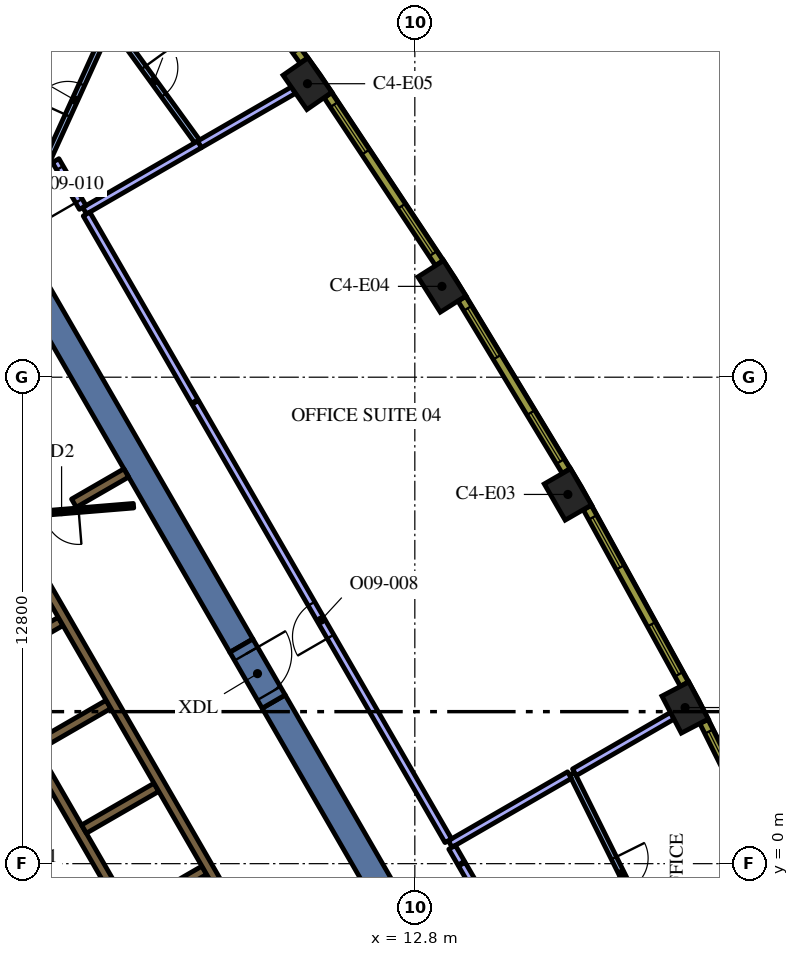
"""IFC4 building model, lengths in metres.
Left out: names, types, materials, properties, quantities, classifications, styles, units other than length and angle.
Written with IfcOpenShell. Run it as: python <this file> out.ifc"""

import sys

from ifc_helpers import new_model, si_unit, direction, frame, frame_2d, origin, origin_2d, place, context, subcontext, project, spatial, rectangle, extrude, element, fill, save


model = new_model("IFC4")
c1 = context("Model", 3, precision=1e-05, world=origin(), true_north=direction((0.0, 1.0)))
c2 = subcontext(c1, "Body", "Model", "MODEL_VIEW")
j1 = project(units=[si_unit("LENGTHUNIT", "METRE"), si_unit("PLANEANGLEUNIT", "RADIAN")], contexts=[c1])
p1 = place(None, origin())
s1 = spatial("IfcSite", under=j1, at=p1, CompositionType="ELEMENT")
p2 = place(p1, origin())
s2 = spatial("IfcBuilding", under=s1, at=p2, CompositionType="ELEMENT")
p3 = place(p2, frame((0.0, 0.0, 243.6)))
s3 = spatial("IfcBuildingStorey", under=s2, at=p3, CompositionType="ELEMENT", Elevation=243.6)
for number, where, z_axis, x_axis in (
    (1, (19.912, 4.108, 0.0), (0.0, 0.0, 1.0), (-0.464, 0.886, 0.0)),
    (2, (16.827, 9.715, 0.0), (0.0, 0.0, 1.0), (-0.5, 0.866, 0.0)),
    (3, (13.513, 15.19, 0.0), (0.0, 0.0, 1.0), (-0.536, 0.845, 0.0)),
    (4, (9.975, 20.522, 0.0), (0.0, 0.0, 1.0), (-0.57, 0.822, 0.0)),
):
    element("IfcColumn", number, at=place(p3, frame(where, z_axis=z_axis, x_axis=x_axis)), inside=s3, PredefinedType="COLUMN", context=c2, shape_type="SweptSolid", body=[
        extrude(rectangle(XDim=1.1, YDim=0.8, at=origin_2d()), origin(), (0.0, 0.0, 1.0), 4.2),
    ])
for number, where, z_axis, x_axis in (
    (5, (9.085, 4.264, 0.0), (0.0, 0.0, 1.0), (0.5, -0.866, 0.0)),
    (6, (8.235, 5.736, 0.0), (0.0, 0.0, 1.0), (-0.5, 0.866, 0.0)),
):
    element("IfcWall", number, at=place(p3, frame(where, z_axis=z_axis, x_axis=x_axis)), inside=s3, PredefinedType="SOLIDWALL", context=c2, shape_type="SweptSolid", body=[
        extrude(rectangle(XDim=12.472, YDim=0.7, at=frame_2d((6.236, 0.0))), origin(), (0.0, 0.0, 1.0), 4.2),
    ])
p4 = place(p3, frame((6.568, -3.627, 0.0), z_axis=(0.0, 0.0, 1.0), x_axis=(-0.499999455981, 0.866025717874, 0.0)))
e7 = element("IfcWall", 7, at=p4, inside=s3, PredefinedType="SOLIDWALL", context=c2, shape_type="SweptSolid", body=[
    extrude(rectangle(XDim=11.978, YDim=0.25, at=frame_2d((5.989, 0.0))), origin(), (0.0, 0.0, 1.0), 4.2),
])
p5 = place(p3, frame((1.574, 5.274, 0.0), z_axis=(0.0, 0.0, 1.0), x_axis=(0.866028486751, 0.499994660107, 0.0)))
e8 = element("IfcWall", 8, at=p5, inside=s3, PredefinedType="SOLIDWALL", context=c2, shape_type="SweptSolid", body=[
    extrude(rectangle(XDim=2.2, YDim=0.25, at=frame_2d((1.1, 0.0))), origin(), (0.0, 0.0, 1.0), 4.2),
])
for number, where, z_axis, x_axis in (
    (9, (2.834, 3.091, 0.0), (0.0, 0.0, 1.0), (0.866, 0.5, 0.0)),
    (10, (4.094, 0.909, 0.0), (0.0, 0.0, 1.0), (0.866, 0.5, 0.0)),
    (11, (5.354, -1.274, 0.0), (0.0, 0.0, 1.0), (0.866, 0.5, 0.0)),
):
    element("IfcWall", number, at=place(p3, frame(where, z_axis=z_axis, x_axis=x_axis)), inside=s3, PredefinedType="SOLIDWALL", context=c2, shape_type="SweptSolid", body=[
        extrude(rectangle(XDim=2.2, YDim=0.25, at=frame_2d((1.1, 0.0))), origin(), (0.0, 0.0, 1.0), 4.2),
    ])
p6 = place(p3, frame((3.83, 9.486, 0.0), z_axis=(0.0, 0.0, 1.0), x_axis=(0.865986202621, 0.500067892261, 0.0)))
e12 = element("IfcWall", 12, at=p6, inside=s3, PredefinedType="SOLIDWALL", context=c2, shape_type="SweptSolid", body=[
    extrude(rectangle(XDim=1.591, YDim=0.25, at=frame_2d((0.795, 0.0))), origin(), (0.0, 0.0, 1.0), 4.2),
])
p7 = place(p3, frame((8.565, -2.185, 0.0), z_axis=(0.0, 0.0, 1.0), x_axis=(-0.499997954832, 0.866026584559, 0.0)))
e13 = element("IfcWall", 13, at=p7, inside=s3, PredefinedType="SOLIDWALL", context=c2, shape_type="SweptSolid", body=[
    extrude(rectangle(XDim=12.35, YDim=0.25, at=frame_2d((6.175, 0.0))), origin(), (0.0, 0.0, 1.0), 4.2),
])
p8 = place(p7, frame((0.585, 0.0, 0.0)))
e14 = element("IfcOpeningElement", 14, at=p8, cuts=e13, PredefinedType="OPENING", context=c2, shape_type="SweptSolid", body=[
    extrude(rectangle(XDim=1.1, YDim=2.1, at=frame_2d((0.55, 1.05))), frame((0.0, 0.135, 0.0), z_axis=(0.0, -1.0, 0.0), x_axis=(1.0, 0.0, 0.0)), (0.0, 0.0, 1.0), 0.27),
])
p9 = place(p3, frame((5.398, 9.419, 0.0), z_axis=(0.0, 0.0, 1.0), x_axis=(-0.996653416376, -0.081743303248, 0.0)))
e15 = element("IfcWall", 15, at=p9, inside=s3, PredefinedType="PARTITIONING", context=c2, shape_type="SweptSolid", body=[
    extrude(rectangle(XDim=2.7, YDim=0.12, at=frame_2d((1.35, 0.0))), origin(), (0.0, 0.0, 1.0), 3.45),
])
p10 = place(p9, frame((1.45, 0.0, 0.0)))
e16 = element("IfcOpeningElement", 16, at=p10, cuts=e15, PredefinedType="OPENING", context=c2, shape_type="SweptSolid", body=[
    extrude(rectangle(XDim=0.9, YDim=2.1, at=frame_2d((0.45, 1.05))), frame((0.0, 0.07, 0.0), z_axis=(0.0, -1.0, 0.0), x_axis=(1.0, 0.0, 0.0)), (0.0, 0.0, 1.0), 0.14),
])
p11 = place(p3, frame((8.235, 5.736, 0.0), z_axis=(0.0, 0.0, 1.0), x_axis=(0.499954529098, -0.86605165483, 0.0)))
e17 = element("IfcWall", 17, at=p11, inside=s3, PredefinedType="SOLIDWALL", context=c2, shape_type="SweptSolid", body=[
    extrude(rectangle(XDim=1.7, YDim=0.7, at=frame_2d((0.85, 0.0))), origin(), (0.0, 0.0, 1.0), 4.2),
])
p12 = place(p11, frame((0.25, 0.0, 0.0)))
e18 = element("IfcOpeningElement", 18, at=p12, cuts=e17, PredefinedType="OPENING", context=c2, shape_type="SweptSolid", body=[
    extrude(rectangle(XDim=1.2, YDim=2.1, at=frame_2d((0.6, 1.05))), frame((0.0, 0.36, 0.0), z_axis=(0.0, -1.0, 0.0), x_axis=(1.0, 0.0, 0.0)), (0.0, 0.0, 1.0), 0.72),
])
p13 = place(p3, frame((16.935, 2.368, 0.0), z_axis=(0.0, 0.0, 1.0), x_axis=(0.445153322039, -0.895454365045, 0.0)))
e19 = element("IfcWall", 19, at=p13, inside=s3, PredefinedType="PARTITIONING", context=c2, shape_type="SweptSolid", body=[
    extrude(rectangle(XDim=5.881, YDim=0.15, at=frame_2d((2.94, 0.0))), origin(), (0.0, 0.0, 1.0), 3.45),
])
p14 = place(p13, frame((2.481, 0.0, 0.0)))
e20 = element("IfcOpeningElement", 20, at=p14, cuts=e19, PredefinedType="OPENING", context=c2, shape_type="SweptSolid", body=[
    extrude(rectangle(XDim=0.9, YDim=2.1, at=frame_2d((0.45, 1.05))), frame((0.0, 0.085, 0.0), z_axis=(0.0, -1.0, 0.0), x_axis=(1.0, 0.0, 0.0)), (0.0, 0.0, 1.0), 0.17),
])
p15 = place(p3, frame((17.0, 2.406, 0.0), z_axis=(0.0, 0.0, 1.0), x_axis=(0.86605561342, 0.499947671726, 0.0)))
e21 = element("IfcWall", 21, at=p15, inside=s3, PredefinedType="PARTITIONING", context=c2, shape_type="SweptSolid", body=[
    extrude(rectangle(XDim=2.971, YDim=0.2, at=frame_2d((1.486, 0.0))), origin(), (0.0, 0.0, 1.0), 3.45),
])
p16 = place(p3, frame((13.731, 0.518, 0.0), z_axis=(0.0, 0.0, 1.0), x_axis=(0.8660128559, 0.500021732944, 0.0)))
e22 = element("IfcWall", 22, at=p16, inside=s3, PredefinedType="PARTITIONING", context=c2, shape_type="SweptSolid", body=[
    extrude(rectangle(XDim=3.625, YDim=0.2, at=frame_2d((1.812, 0.0))), origin(), (0.0, 0.0, 1.0), 3.45),
])
p17 = place(p3, frame((14.022, 0.013, 0.0), z_axis=(0.0, 0.0, 1.0), x_axis=(-0.500159754115, 0.865933150054, 0.0)))
e23 = element("IfcWall", 23, at=p17, inside=s3, PredefinedType="PARTITIONING", context=c2, shape_type="SweptSolid", body=[
    extrude(rectangle(XDim=0.483, YDim=0.2, at=frame_2d((0.242, 0.0))), origin(), (0.0, 0.0, 1.0), 3.45),
])
p18 = place(p3, frame((17.681, -6.324, 0.0), z_axis=(0.0, 0.0, 1.0), x_axis=(-0.50002695829, 0.866009838849, 0.0)))
e24 = element("IfcWall", 24, at=p18, inside=s3, PredefinedType="PARTITIONING", context=c2, shape_type="SweptSolid", body=[
    extrude(rectangle(XDim=7.287, YDim=0.2, at=frame_2d((3.644, 0.0))), origin(), (0.0, 0.0, 1.0), 3.45),
])
p19 = place(p18, frame((3.1, 0.0, 0.0)))
e25 = element("IfcOpeningElement", 25, at=p19, cuts=e24, PredefinedType="OPENING", context=c2, shape_type="SweptSolid", body=[
    extrude(rectangle(XDim=1.0, YDim=2.1, at=frame_2d((0.5, 1.05))), frame((0.0, 0.11, 0.0), z_axis=(0.0, -1.0, 0.0), x_axis=(1.0, 0.0, 0.0)), (0.0, 0.0, 1.0), 0.22),
])
p20 = place(p3, frame((7.128, 18.922, 0.0), z_axis=(0.0, 0.0, 1.0), x_axis=(0.866023575777, 0.500003166188, 0.0)))
e26 = element("IfcWall", 26, at=p20, inside=s3, PredefinedType="PARTITIONING", context=c2, shape_type="SweptSolid", body=[
    extrude(rectangle(XDim=2.861, YDim=0.2, at=frame_2d((1.43, 0.0))), origin(), (0.0, 0.0, 1.0), 3.45),
])
p21 = place(p3, frame((4.111, 17.18, 0.0), z_axis=(0.0, 0.0, 1.0), x_axis=(0.866031916153, 0.499988720078, 0.0)))
e27 = element("IfcWall", 27, at=p21, inside=s3, PredefinedType="PARTITIONING", context=c2, shape_type="SweptSolid", body=[
    extrude(rectangle(XDim=3.492, YDim=0.2, at=frame_2d((1.746, 0.0))), origin(), (0.0, 0.0, 1.0), 3.45),
])
p22 = place(p3, frame((13.681, 0.604, 0.0), z_axis=(0.0, 0.0, 1.0), x_axis=(-0.500001759768, 0.86602438778, 0.0)))
e28 = element("IfcWall", 28, at=p22, inside=s3, PredefinedType="PARTITIONING", context=c2, shape_type="SweptSolid", body=[
    extrude(rectangle(XDim=13.317, YDim=0.2, at=frame_2d((6.658, 0.0))), origin(), (0.0, 0.0, 1.0), 3.45),
])
p23 = place(p22, frame((6.2, 0.0, 0.0)))
e29 = element("IfcOpeningElement", 29, at=p23, cuts=e28, PredefinedType="OPENING", context=c2, shape_type="SweptSolid", body=[
    extrude(rectangle(XDim=1.0, YDim=2.1, at=frame_2d((0.5, 1.05))), frame((0.0, 0.11, 0.0), z_axis=(0.0, -1.0, 0.0), x_axis=(1.0, 0.0, 0.0)), (0.0, 0.0, 1.0), 0.22),
])
p24 = place(p3, frame((7.007, 12.163, 0.0), z_axis=(0.0, 0.0, 1.0), x_axis=(-0.499986040413, 0.866033463206, 0.0)))
e30 = element("IfcWall", 30, at=p24, inside=s3, PredefinedType="PARTITIONING", context=c2, shape_type="SweptSolid", body=[
    extrude(rectangle(XDim=5.693, YDim=0.2, at=frame_2d((2.846, 0.0))), origin(), (0.0, 0.0, 1.0), 3.45),
])
p25 = place(p3, frame((4.791, 22.152, 0.0), z_axis=(0.0, 0.0, 1.0), x_axis=(0.586987127968, -0.809596264567, 0.0)))
e31 = element("IfcWall", 31, at=p25, inside=s3, PredefinedType="PARTITIONING", context=c2, shape_type="SweptSolid", body=[
    extrude(rectangle(XDim=3.887, YDim=0.15, at=frame_2d((1.943, 0.0))), origin(), (0.0, 0.0, 1.0), 3.45),
])
p26 = place(p25, frame((1.487, 0.0, 0.0)))
e32 = element("IfcOpeningElement", 32, at=p26, cuts=e31, PredefinedType="OPENING", context=c2, shape_type="SweptSolid", body=[
    extrude(rectangle(XDim=0.9, YDim=2.1, at=frame_2d((0.45, 1.05))), frame((0.0, 0.085, 0.0), z_axis=(0.0, -1.0, 0.0), x_axis=(1.0, 0.0, 0.0)), (0.0, 0.0, 1.0), 0.17),
])
p27 = place(p3, frame((3.129, 18.5, 0.0), z_axis=(0.0, 0.0, 1.0), x_axis=(0.414332290546, 0.910125679789, 0.0)))
e33 = element("IfcWall", 33, at=p27, inside=s3, PredefinedType="PARTITIONING", context=c2, shape_type="SweptSolid", body=[
    extrude(rectangle(XDim=3.926, YDim=0.15, at=frame_2d((1.963, 0.0))), origin(), (0.0, 0.0, 1.0), 3.45),
])
p28 = place(p27, frame((1.3, 0.0, 0.0)))
e34 = element("IfcOpeningElement", 34, at=p28, cuts=e33, PredefinedType="OPENING", context=c2, shape_type="SweptSolid", body=[
    extrude(rectangle(XDim=0.9, YDim=2.1, at=frame_2d((0.45, 1.05))), frame((0.0, 0.085, 0.0), z_axis=(0.0, -1.0, 0.0), x_axis=(1.0, 0.0, 0.0)), (0.0, 0.0, 1.0), 0.17),
])
p29 = place(p3, frame((4.061, 17.266, 0.0), z_axis=(0.0, 0.0, 1.0), x_axis=(-0.49995489152, 0.866051445611, 0.0)))
e35 = element("IfcWall", 35, at=p29, inside=s3, PredefinedType="PARTITIONING", context=c2, shape_type="SweptSolid", body=[
    extrude(rectangle(XDim=1.425, YDim=0.2, at=frame_2d((0.712, 0.0))), origin(), (0.0, 0.0, 1.0), 3.45),
])
p30 = place(p29, frame((0.2, 0.0, 0.0)))
e36 = element("IfcOpeningElement", 36, at=p30, cuts=e35, PredefinedType="OPENING", context=c2, shape_type="SweptSolid", body=[
    extrude(rectangle(XDim=1.0, YDim=2.1, at=frame_2d((0.5, 1.05))), frame((0.0, 0.11, 0.0), z_axis=(0.0, -1.0, 0.0), x_axis=(1.0, 0.0, 0.0)), (0.0, 0.0, 1.0), 0.22),
])
p31 = place(p3, frame((22.766, -1.005, 0.0), z_axis=(0.0, 0.0, 1.0), x_axis=(-0.445129582031, 0.895466166419, 0.0)))
e37 = element("IfcWall", 37, at=p31, inside=s3, PredefinedType="SOLIDWALL", context=c2, shape_type="SweptSolid", body=[
    extrude(rectangle(XDim=5.298, YDim=0.24, at=frame_2d((2.649, 0.0))), origin(), (0.0, 0.0, 1.0), 3.95),
])
p32 = place(p31, frame((0.295, 0.0, 0.9)))
e38 = element("IfcOpeningElement", 38, at=p32, cuts=e37, PredefinedType="OPENING", context=c2, shape_type="SweptSolid", body=[
    extrude(rectangle(XDim=1.5, YDim=2.55, at=frame_2d((0.75, 1.275))), frame((0.0, 0.13, 0.0), z_axis=(0.0, -1.0, 0.0), x_axis=(1.0, 0.0, 0.0)), (0.0, 0.0, 1.0), 0.26),
])
p33 = place(p31, frame((3.504, 0.0, 0.9)))
e39 = element("IfcOpeningElement", 39, at=p33, cuts=e37, PredefinedType="OPENING", context=c2, shape_type="SweptSolid", body=[
    extrude(rectangle(XDim=1.5, YDim=2.55, at=frame_2d((0.75, 1.275))), frame((0.0, 0.13, 0.0), z_axis=(0.0, -1.0, 0.0), x_axis=(1.0, 0.0, 0.0)), (0.0, 0.0, 1.0), 0.26),
])
p34 = place(p3, frame((19.892, 4.725, 0.0), z_axis=(0.0, 0.0, 1.0), x_axis=(-0.481925825015, 0.876212017256, 0.0)))
e40 = element("IfcWall", 40, at=p34, inside=s3, PredefinedType="SOLIDWALL", context=c2, shape_type="SweptSolid", body=[
    extrude(rectangle(XDim=5.299, YDim=0.24, at=frame_2d((2.649, 0.0))), origin(), (0.0, 0.0, 1.0), 3.95),
])
p35 = place(p34, frame((0.295, 0.0, 0.9)))
e41 = element("IfcOpeningElement", 41, at=p35, cuts=e40, PredefinedType="OPENING", context=c2, shape_type="SweptSolid", body=[
    extrude(rectangle(XDim=1.5, YDim=2.55, at=frame_2d((0.75, 1.275))), frame((0.0, 0.13, 0.0), z_axis=(0.0, -1.0, 0.0), x_axis=(1.0, 0.0, 0.0)), (0.0, 0.0, 1.0), 0.26),
])
p36 = place(p34, frame((3.504, 0.0, 0.9)))
e42 = element("IfcOpeningElement", 42, at=p36, cuts=e40, PredefinedType="OPENING", context=c2, shape_type="SweptSolid", body=[
    extrude(rectangle(XDim=1.5, YDim=2.55, at=frame_2d((0.75, 1.275))), frame((0.0, 0.13, 0.0), z_axis=(0.0, -1.0, 0.0), x_axis=(1.0, 0.0, 0.0)), (0.0, 0.0, 1.0), 0.26),
])
p37 = place(p3, frame((16.782, 10.331, 0.0), z_axis=(0.0, 0.0, 1.0), x_axis=(-0.517846166225, 0.855473756538, 0.0)))
e43 = element("IfcWall", 43, at=p37, inside=s3, PredefinedType="SOLIDWALL", context=c2, shape_type="SweptSolid", body=[
    extrude(rectangle(XDim=5.298, YDim=0.24, at=frame_2d((2.649, 0.0))), origin(), (0.0, 0.0, 1.0), 3.95),
])
p38 = place(p37, frame((0.294, 0.0, 0.9)))
e44 = element("IfcOpeningElement", 44, at=p38, cuts=e43, PredefinedType="OPENING", context=c2, shape_type="SweptSolid", body=[
    extrude(rectangle(XDim=1.5, YDim=2.55, at=frame_2d((0.75, 1.275))), frame((0.0, 0.13, 0.0), z_axis=(0.0, -1.0, 0.0), x_axis=(1.0, 0.0, 0.0)), (0.0, 0.0, 1.0), 0.26),
])
p39 = place(p37, frame((3.504, 0.0, 0.9)))
e45 = element("IfcOpeningElement", 45, at=p39, cuts=e43, PredefinedType="OPENING", context=c2, shape_type="SweptSolid", body=[
    extrude(rectangle(XDim=1.5, YDim=2.55, at=frame_2d((0.75, 1.275))), frame((0.0, 0.13, 0.0), z_axis=(0.0, -1.0, 0.0), x_axis=(1.0, 0.0, 0.0)), (0.0, 0.0, 1.0), 0.26),
])
p40 = place(p3, frame((13.442, 15.803, 0.0), z_axis=(0.0, 0.0, 1.0), x_axis=(-0.552901821755, 0.833246407433, 0.0)))
e46 = element("IfcWall", 46, at=p40, inside=s3, PredefinedType="SOLIDWALL", context=c2, shape_type="SweptSolid", body=[
    extrude(rectangle(XDim=5.298, YDim=0.24, at=frame_2d((2.649, 0.0))), origin(), (0.0, 0.0, 1.0), 3.95),
])
p41 = place(p40, frame((0.295, 0.0, 0.9)))
e47 = element("IfcOpeningElement", 47, at=p41, cuts=e46, PredefinedType="OPENING", context=c2, shape_type="SweptSolid", body=[
    extrude(rectangle(XDim=1.5, YDim=2.55, at=frame_2d((0.75, 1.275))), frame((0.0, 0.13, 0.0), z_axis=(0.0, -1.0, 0.0), x_axis=(1.0, 0.0, 0.0)), (0.0, 0.0, 1.0), 0.26),
])
p42 = place(p40, frame((3.504, 0.0, 0.9)))
e48 = element("IfcOpeningElement", 48, at=p42, cuts=e46, PredefinedType="OPENING", context=c2, shape_type="SweptSolid", body=[
    extrude(rectangle(XDim=1.5, YDim=2.55, at=frame_2d((0.75, 1.275))), frame((0.0, 0.13, 0.0), z_axis=(0.0, -1.0, 0.0), x_axis=(1.0, 0.0, 0.0)), (0.0, 0.0, 1.0), 0.26),
])
p43 = place(p3, frame((9.878, 21.132, 0.0), z_axis=(0.0, 0.0, 1.0), x_axis=(-0.586998456641, 0.80958805074, 0.0)))
e49 = element("IfcWall", 49, at=p43, inside=s3, PredefinedType="SOLIDWALL", context=c2, shape_type="SweptSolid", body=[
    extrude(rectangle(XDim=5.311, YDim=0.24, at=frame_2d((2.655, 0.0))), origin(), (0.0, 0.0, 1.0), 3.95),
])
p44 = place(p43, frame((0.306, 0.0, 0.9)))
e50 = element("IfcOpeningElement", 50, at=p44, cuts=e49, PredefinedType="OPENING", context=c2, shape_type="SweptSolid", body=[
    extrude(rectangle(XDim=1.5, YDim=2.55, at=frame_2d((0.75, 1.275))), frame((0.0, 0.13, 0.0), z_axis=(0.0, -1.0, 0.0), x_axis=(1.0, 0.0, 0.0)), (0.0, 0.0, 1.0), 0.26),
])
p45 = place(p43, frame((3.539, 0.0, 0.9)))
e51 = element("IfcOpeningElement", 51, at=p45, cuts=e49, PredefinedType="OPENING", context=c2, shape_type="SweptSolid", body=[
    extrude(rectangle(XDim=1.5, YDim=2.55, at=frame_2d((0.75, 1.275))), frame((0.0, 0.13, 0.0), z_axis=(0.0, -1.0, 0.0), x_axis=(1.0, 0.0, 0.0)), (0.0, 0.0, 1.0), 0.26),
])
p46 = place(p10, origin())
e52 = element("IfcDoor", 52, at=p46, inside=s3, OperationType="SINGLE_SWING_LEFT", PredefinedType="DOOR", context=c2, shape_type="SweptSolid", body=[
    extrude(rectangle(XDim=0.9, YDim=2.1, at=frame_2d((0.45, 1.05))), frame((0.0, 0.025, 0.0), z_axis=(0.0, -1.0, 0.0), x_axis=(1.0, 0.0, 0.0)), (0.0, 0.0, 1.0), 0.05),
])
fill(e16, e52)
p47 = place(p12, origin())
e53 = element("IfcDoor", 53, at=p47, inside=s3, OperationType="SINGLE_SWING_LEFT", PredefinedType="DOOR", context=c2, shape_type="SweptSolid", body=[
    extrude(rectangle(XDim=1.2, YDim=2.1, at=frame_2d((0.6, 1.05))), frame((0.0, 0.025, 0.0), z_axis=(0.0, -1.0, 0.0), x_axis=(1.0, 0.0, 0.0)), (0.0, 0.0, 1.0), 0.05),
])
fill(e18, e53)
p48 = place(p14, origin())
e54 = element("IfcDoor", 54, at=p48, inside=s3, OperationType="SINGLE_SWING_LEFT", PredefinedType="DOOR", context=c2, shape_type="SweptSolid", body=[
    extrude(rectangle(XDim=0.9, YDim=2.1, at=frame_2d((0.45, 1.05))), frame((0.0, 0.025, 0.0), z_axis=(0.0, -1.0, 0.0), x_axis=(1.0, 0.0, 0.0)), (0.0, 0.0, 1.0), 0.05),
])
fill(e20, e54)
p49 = place(p23, origin())
e55 = element("IfcDoor", 55, at=p49, inside=s3, OperationType="SINGLE_SWING_RIGHT", PredefinedType="DOOR", context=c2, shape_type="SweptSolid", body=[
    extrude(rectangle(XDim=1.0, YDim=2.1, at=frame_2d((0.5, 1.05))), frame((0.0, 0.025, 0.0), z_axis=(0.0, -1.0, 0.0), x_axis=(1.0, 0.0, 0.0)), (0.0, 0.0, 1.0), 0.05),
])
fill(e29, e55)
p50 = place(p26, origin())
e56 = element("IfcDoor", 56, at=p50, inside=s3, OperationType="SINGLE_SWING_LEFT", PredefinedType="DOOR", context=c2, shape_type="SweptSolid", body=[
    extrude(rectangle(XDim=0.9, YDim=2.1, at=frame_2d((0.45, 1.05))), frame((0.0, 0.025, 0.0), z_axis=(0.0, -1.0, 0.0), x_axis=(1.0, 0.0, 0.0)), (0.0, 0.0, 1.0), 0.05),
])
fill(e32, e56)
p51 = place(p30, origin())
e57 = element("IfcDoor", 57, at=p51, inside=s3, OperationType="SINGLE_SWING_LEFT", PredefinedType="DOOR", context=c2, shape_type="SweptSolid", body=[
    extrude(rectangle(XDim=1.0, YDim=2.1, at=frame_2d((0.5, 1.05))), frame((0.0, 0.025, 0.0), z_axis=(0.0, -1.0, 0.0), x_axis=(1.0, 0.0, 0.0)), (0.0, 0.0, 1.0), 0.05),
])
fill(e36, e57)
p52 = place(p28, origin())
e58 = element("IfcDoor", 58, at=p52, inside=s3, OperationType="SINGLE_SWING_LEFT", PredefinedType="DOOR", context=c2, shape_type="SweptSolid", body=[
    extrude(rectangle(XDim=0.9, YDim=2.1, at=frame_2d((0.45, 1.05))), frame((0.0, 0.025, 0.0), z_axis=(0.0, -1.0, 0.0), x_axis=(1.0, 0.0, 0.0)), (0.0, 0.0, 1.0), 0.05),
])
fill(e34, e58)
p53 = place(p33, origin())
e59 = element("IfcWindow", 59, at=p53, inside=s3, PartitioningType="SINGLE_PANEL", PredefinedType="WINDOW", context=c2, shape_type="SweptSolid", body=[
    extrude(rectangle(XDim=1.5, YDim=2.55, at=frame_2d((0.75, 1.275))), frame((0.0, 0.04, 0.0), z_axis=(0.0, -1.0, 0.0), x_axis=(1.0, 0.0, 0.0)), (0.0, 0.0, 1.0), 0.06),
])
fill(e39, e59)
p54 = place(p35, origin())
e60 = element("IfcWindow", 60, at=p54, inside=s3, PartitioningType="SINGLE_PANEL", PredefinedType="WINDOW", context=c2, shape_type="SweptSolid", body=[
    extrude(rectangle(XDim=1.5, YDim=2.55, at=frame_2d((0.75, 1.275))), frame((0.0, 0.04, 0.0), z_axis=(0.0, -1.0, 0.0), x_axis=(1.0, 0.0, 0.0)), (0.0, 0.0, 1.0), 0.06),
])
fill(e41, e60)
p55 = place(p36, origin())
e61 = element("IfcWindow", 61, at=p55, inside=s3, PartitioningType="SINGLE_PANEL", PredefinedType="WINDOW", context=c2, shape_type="SweptSolid", body=[
    extrude(rectangle(XDim=1.5, YDim=2.55, at=frame_2d((0.75, 1.275))), frame((0.0, 0.04, 0.0), z_axis=(0.0, -1.0, 0.0), x_axis=(1.0, 0.0, 0.0)), (0.0, 0.0, 1.0), 0.06),
])
fill(e42, e61)
p56 = place(p38, origin())
e62 = element("IfcWindow", 62, at=p56, inside=s3, PartitioningType="SINGLE_PANEL", PredefinedType="WINDOW", context=c2, shape_type="SweptSolid", body=[
    extrude(rectangle(XDim=1.5, YDim=2.55, at=frame_2d((0.75, 1.275))), frame((0.0, 0.04, 0.0), z_axis=(0.0, -1.0, 0.0), x_axis=(1.0, 0.0, 0.0)), (0.0, 0.0, 1.0), 0.06),
])
fill(e44, e62)
p57 = place(p39, origin())
e63 = element("IfcWindow", 63, at=p57, inside=s3, PartitioningType="SINGLE_PANEL", PredefinedType="WINDOW", context=c2, shape_type="SweptSolid", body=[
    extrude(rectangle(XDim=1.5, YDim=2.55, at=frame_2d((0.75, 1.275))), frame((0.0, 0.04, 0.0), z_axis=(0.0, -1.0, 0.0), x_axis=(1.0, 0.0, 0.0)), (0.0, 0.0, 1.0), 0.06),
])
fill(e45, e63)
p58 = place(p41, origin())
e64 = element("IfcWindow", 64, at=p58, inside=s3, PartitioningType="SINGLE_PANEL", PredefinedType="WINDOW", context=c2, shape_type="SweptSolid", body=[
    extrude(rectangle(XDim=1.5, YDim=2.55, at=frame_2d((0.75, 1.275))), frame((0.0, 0.04, 0.0), z_axis=(0.0, -1.0, 0.0), x_axis=(1.0, 0.0, 0.0)), (0.0, 0.0, 1.0), 0.06),
])
fill(e47, e64)
p59 = place(p42, origin())
e65 = element("IfcWindow", 65, at=p59, inside=s3, PartitioningType="SINGLE_PANEL", PredefinedType="WINDOW", context=c2, shape_type="SweptSolid", body=[
    extrude(rectangle(XDim=1.5, YDim=2.55, at=frame_2d((0.75, 1.275))), frame((0.0, 0.04, 0.0), z_axis=(0.0, -1.0, 0.0), x_axis=(1.0, 0.0, 0.0)), (0.0, 0.0, 1.0), 0.06),
])
fill(e48, e65)
save(model, sys.argv[1])
